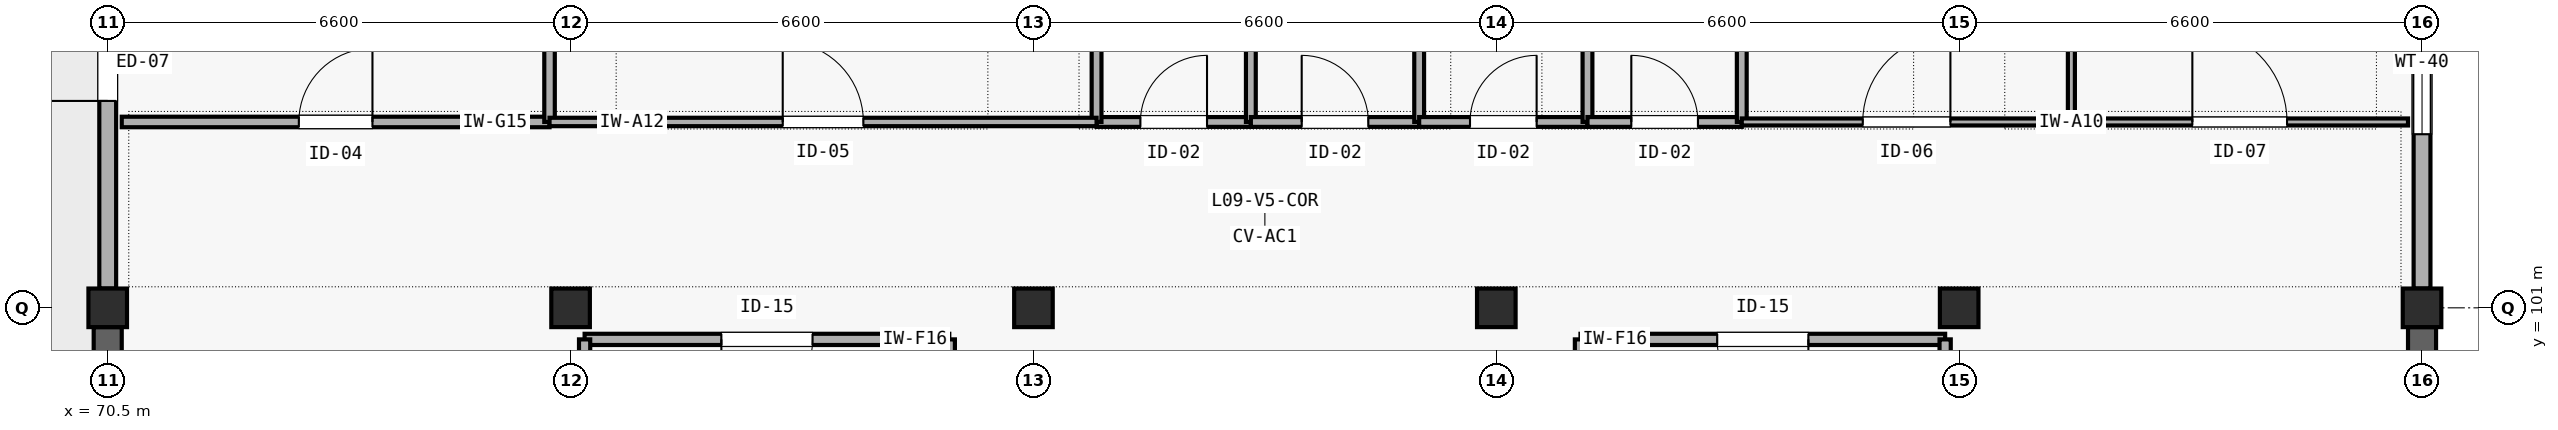
"""IFC4 building model, lengths in metres.
Left out: names, types, materials, properties, quantities, classifications, styles, units other than length and angle.
Written with IfcOpenShell. Run it as: python <this file> out.ifc"""

import sys

from ifc_helpers import new_model, si_unit, direction, frame, frame_2d, origin, origin_2d, place, context, subcontext, project, spatial, rectangle, extrude, element, fill, save


model = new_model("IFC4")
c1 = context("Model", 3, precision=1e-05, world=origin(), true_north=direction((0.0, 1.0)))
c2 = subcontext(c1, "Body", "Model", "MODEL_VIEW")
j1 = project(units=[si_unit("LENGTHUNIT", "METRE"), si_unit("PLANEANGLEUNIT", "RADIAN")], contexts=[c1])
p1 = place(None, origin())
s1 = spatial("IfcSite", under=j1, at=p1, CompositionType="ELEMENT")
p2 = place(p1, origin())
s2 = spatial("IfcBuilding", under=s1, at=p2, CompositionType="ELEMENT")
p3 = place(p2, frame((0.0, 0.0, 37.8)))
s3 = spatial("IfcBuildingStorey", under=s2, at=p3, CompositionType="ELEMENT", Elevation=37.8)
for number, where, z_axis, x_axis in (
    (1, (70.5, 101.0, 0.0), (0.0, 0.0, 1.0), (1.0, 0.0, 0.0)),
    (2, (77.1, 101.0, 0.0), (0.0, 0.0, 1.0), (1.0, 0.0, 0.0)),
    (3, (83.7, 101.0, 0.0), (0.0, 0.0, 1.0), (1.0, 0.0, 0.0)),
    (4, (90.3, 101.0, 0.0), (0.0, 0.0, 1.0), (1.0, 0.0, 0.0)),
    (5, (96.9, 101.0, 0.0), (0.0, 0.0, 1.0), (1.0, 0.0, 0.0)),
    (6, (103.5, 101.0, 0.0), (0.0, 0.0, 1.0), (1.0, 0.0, 0.0)),
):
    element("IfcColumn", number, at=place(p3, frame(where, z_axis=z_axis, x_axis=x_axis)), inside=s3, PredefinedType="COLUMN", context=c2, shape_type="SweptSolid", body=[
        extrude(rectangle(XDim=0.55, YDim=0.55, at=origin_2d()), origin(), (0.0, 0.0, 1.0), 4.2),
    ])
p4 = place(p3, frame((70.5, 97.96, 0.0), z_axis=(0.0, 0.0, 1.0), x_axis=(0.0, 1.0, 0.0)))
e7 = element("IfcWall", 7, at=p4, inside=s3, PredefinedType="SHEAR", context=c2, shape_type="SweptSolid", body=[
    extrude(rectangle(XDim=2.765, YDim=0.4, at=frame_2d((1.383, 0.0))), origin(), (0.0, 0.0, 1.0), 3.85),
])
p5 = place(p3, frame((70.5, 101.275, 0.0), z_axis=(0.0, 0.0, 1.0), x_axis=(0.0, 1.0, 0.0)))
e8 = element("IfcWall", 8, at=p5, inside=s3, PredefinedType="SOLIDWALL", context=c2, shape_type="SweptSolid", body=[
    extrude(rectangle(XDim=6.45, YDim=0.24, at=frame_2d((3.225, 0.0))), origin(), (0.0, 0.0, 1.0), 3.465),
])
p6 = place(p5, frame((2.675, 0.0, 0.0)))
e9 = element("IfcOpeningElement", 9, at=p6, cuts=e8, PredefinedType="OPENING", context=c2, shape_type="SweptSolid", body=[
    extrude(rectangle(XDim=1.1, YDim=2.1, at=frame_2d((0.55, 1.05))), frame((0.0, 0.13, 0.0), z_axis=(0.0, -1.0, 0.0), x_axis=(1.0, 0.0, 0.0)), (0.0, 0.0, 1.0), 0.26),
])
p7 = place(p3, frame((103.5, 97.96, 0.0), z_axis=(0.0, 0.0, 1.0), x_axis=(0.0, 1.0, 0.0)))
e10 = element("IfcWall", 10, at=p7, inside=s3, PredefinedType="SHEAR", context=c2, shape_type="SweptSolid", body=[
    extrude(rectangle(XDim=2.765, YDim=0.4, at=frame_2d((1.383, 0.0))), origin(), (0.0, 0.0, 1.0), 3.85),
])
p8 = place(p3, frame((103.5, 101.275, 0.0), z_axis=(0.0, 0.0, 1.0), x_axis=(0.0, 1.0, 0.0)))
e11 = element("IfcWall", 11, at=p8, inside=s3, PredefinedType="SOLIDWALL", context=c2, shape_type="SweptSolid", body=[
    extrude(rectangle(XDim=6.45, YDim=0.24, at=frame_2d((3.225, 0.0))), origin(), (0.0, 0.0, 1.0), 3.565),
])
p9 = place(p8, frame((2.2, 0.0, 0.85)))
e12 = element("IfcOpeningElement", 12, at=p9, cuts=e11, PredefinedType="OPENING", context=c2, shape_type="SweptSolid", body=[
    extrude(rectangle(XDim=2.05, YDim=1.55, at=frame_2d((1.025, 0.775))), frame((0.0, 0.13, 0.0), z_axis=(0.0, -1.0, 0.0), x_axis=(1.0, 0.0, 0.0)), (0.0, 0.0, 1.0), 0.26),
])
p10 = place(p3, frame((77.3, 100.55, 0.0), z_axis=(0.0, 0.0, 1.0), x_axis=(1.0, 0.0, 0.0)))
e13 = element("IfcWall", 13, at=p10, inside=s3, PredefinedType="SOLIDWALL", context=c2, shape_type="SweptSolid", body=[
    extrude(rectangle(XDim=5.2, YDim=0.16, at=frame_2d((2.6, 0.0))), origin(), (0.0, 0.0, 1.0), 3.9),
])
p11 = place(p10, frame((1.95, 0.0, 0.0)))
e14 = element("IfcOpeningElement", 14, at=p11, cuts=e13, PredefinedType="OPENING", context=c2, shape_type="SweptSolid", body=[
    extrude(rectangle(XDim=1.3, YDim=2.15, at=frame_2d((0.65, 1.075))), frame((0.0, 0.09, 0.0), z_axis=(0.0, -1.0, 0.0), x_axis=(1.0, 0.0, 0.0)), (0.0, 0.0, 1.0), 0.18),
])
p12 = place(p3, frame((77.3, 97.5, 0.0), z_axis=(0.0, 0.0, 1.0), x_axis=(0.0, 1.0, 0.0)))
e15 = element("IfcWall", 15, at=p12, inside=s3, PredefinedType="SOLIDWALL", context=c2, shape_type="SweptSolid", body=[
    extrude(rectangle(XDim=3.05, YDim=0.16, at=frame_2d((1.525, 0.0))), origin(), (0.0, 0.0, 1.0), 3.405),
])
p13 = place(p3, frame((82.5, 97.5, 0.0), z_axis=(0.0, 0.0, 1.0), x_axis=(0.0, 1.0, 0.0)))
e16 = element("IfcWall", 16, at=p13, inside=s3, PredefinedType="SOLIDWALL", context=c2, shape_type="SweptSolid", body=[
    extrude(rectangle(XDim=3.05, YDim=0.16, at=frame_2d((1.525, 0.0))), origin(), (0.0, 0.0, 1.0), 3.9),
])
p14 = place(p3, frame((91.5, 100.55, 0.0), z_axis=(0.0, 0.0, 1.0), x_axis=(1.0, 0.0, 0.0)))
e17 = element("IfcWall", 17, at=p14, inside=s3, PredefinedType="SOLIDWALL", context=c2, shape_type="SweptSolid", body=[
    extrude(rectangle(XDim=5.2, YDim=0.16, at=frame_2d((2.6, 0.0))), origin(), (0.0, 0.0, 1.0), 3.9),
])
p15 = place(p14, frame((1.95, 0.0, 0.0)))
e18 = element("IfcOpeningElement", 18, at=p15, cuts=e17, PredefinedType="OPENING", context=c2, shape_type="SweptSolid", body=[
    extrude(rectangle(XDim=1.3, YDim=2.15, at=frame_2d((0.65, 1.075))), frame((0.0, 0.09, 0.0), z_axis=(0.0, -1.0, 0.0), x_axis=(1.0, 0.0, 0.0)), (0.0, 0.0, 1.0), 0.18),
])
p16 = place(p3, frame((91.5, 97.5, 0.0), z_axis=(0.0, 0.0, 1.0), x_axis=(0.0, 1.0, 0.0)))
e19 = element("IfcWall", 19, at=p16, inside=s3, PredefinedType="SOLIDWALL", context=c2, shape_type="SweptSolid", body=[
    extrude(rectangle(XDim=3.05, YDim=0.16, at=frame_2d((1.525, 0.0))), origin(), (0.0, 0.0, 1.0), 3.9),
])
p17 = place(p3, frame((96.7, 97.5, 0.0), z_axis=(0.0, 0.0, 1.0), x_axis=(0.0, 1.0, 0.0)))
e20 = element("IfcWall", 20, at=p17, inside=s3, PredefinedType="SOLIDWALL", context=c2, shape_type="SweptSolid", body=[
    extrude(rectangle(XDim=3.05, YDim=0.16, at=frame_2d((1.525, 0.0))), origin(), (0.0, 0.0, 1.0), 3.405),
])
p18 = place(p3, frame((84.6, 103.65, 0.0), z_axis=(0.0, 0.0, 1.0), x_axis=(1.0, 0.0, 0.0)))
e21 = element("IfcWall", 21, at=p18, inside=s3, PredefinedType="PLUMBINGWALL", context=c2, shape_type="SweptSolid", body=[
    extrude(rectangle(XDim=2.2, YDim=0.14, at=frame_2d((1.1, 0.0))), origin(), (0.0, 0.0, 1.0), 3.9),
])
p19 = place(p18, frame((0.625, 0.0, 0.0)))
e22 = element("IfcOpeningElement", 22, at=p19, cuts=e21, PredefinedType="OPENING", context=c2, shape_type="SweptSolid", body=[
    extrude(rectangle(XDim=0.95, YDim=2.1, at=frame_2d((0.475, 1.05))), frame((0.0, 0.08, 0.0), z_axis=(0.0, -1.0, 0.0), x_axis=(1.0, 0.0, 0.0)), (0.0, 0.0, 1.0), 0.16),
])
for number, where, z_axis, x_axis in (
    (23, (84.6, 103.65, 0.0), (0.0, 0.0, 1.0), (0.0, 1.0, 0.0)),
    (24, (86.8, 103.65, 0.0), (0.0, 0.0, 1.0), (0.0, 1.0, 0.0)),
):
    element("IfcWall", number, at=place(p3, frame(where, z_axis=z_axis, x_axis=x_axis)), inside=s3, PredefinedType="PLUMBINGWALL", context=c2, shape_type="SweptSolid", body=[
        extrude(rectangle(XDim=4.15, YDim=0.14, at=frame_2d((2.075, 0.0))), origin(), (0.0, 0.0, 1.0), 3.9),
    ])
p20 = place(p3, frame((86.8, 103.65, 0.0), z_axis=(0.0, 0.0, 1.0), x_axis=(1.0, 0.0, 0.0)))
e25 = element("IfcWall", 25, at=p20, inside=s3, PredefinedType="PLUMBINGWALL", context=c2, shape_type="SweptSolid", body=[
    extrude(rectangle(XDim=2.4, YDim=0.14, at=frame_2d((1.2, 0.0))), origin(), (0.0, 0.0, 1.0), 3.9),
])
p21 = place(p20, frame((0.725, 0.0, 0.0)))
e26 = element("IfcOpeningElement", 26, at=p21, cuts=e25, PredefinedType="OPENING", context=c2, shape_type="SweptSolid", body=[
    extrude(rectangle(XDim=0.95, YDim=2.1, at=frame_2d((0.475, 1.05))), frame((0.0, 0.08, 0.0), z_axis=(0.0, -1.0, 0.0), x_axis=(1.0, 0.0, 0.0)), (0.0, 0.0, 1.0), 0.16),
])
p22 = place(p3, frame((89.2, 103.65, 0.0), z_axis=(0.0, 0.0, 1.0), x_axis=(0.0, 1.0, 0.0)))
e27 = element("IfcWall", 27, at=p22, inside=s3, PredefinedType="PLUMBINGWALL", context=c2, shape_type="SweptSolid", body=[
    extrude(rectangle(XDim=4.15, YDim=0.14, at=frame_2d((2.075, 0.0))), origin(), (0.0, 0.0, 1.0), 3.9),
])
p23 = place(p3, frame((89.2, 103.65, 0.0), z_axis=(0.0, 0.0, 1.0), x_axis=(1.0, 0.0, 0.0)))
e28 = element("IfcWall", 28, at=p23, inside=s3, PredefinedType="PLUMBINGWALL", context=c2, shape_type="SweptSolid", body=[
    extrude(rectangle(XDim=2.4, YDim=0.14, at=frame_2d((1.2, 0.0))), origin(), (0.0, 0.0, 1.0), 3.9),
])
p24 = place(p23, frame((0.725, 0.0, 0.0)))
e29 = element("IfcOpeningElement", 29, at=p24, cuts=e28, PredefinedType="OPENING", context=c2, shape_type="SweptSolid", body=[
    extrude(rectangle(XDim=0.95, YDim=2.1, at=frame_2d((0.475, 1.05))), frame((0.0, 0.08, 0.0), z_axis=(0.0, -1.0, 0.0), x_axis=(1.0, 0.0, 0.0)), (0.0, 0.0, 1.0), 0.16),
])
p25 = place(p3, frame((91.6, 103.65, 0.0), z_axis=(0.0, 0.0, 1.0), x_axis=(0.0, 1.0, 0.0)))
e30 = element("IfcWall", 30, at=p25, inside=s3, PredefinedType="PLUMBINGWALL", context=c2, shape_type="SweptSolid", body=[
    extrude(rectangle(XDim=4.15, YDim=0.14, at=frame_2d((2.075, 0.0))), origin(), (0.0, 0.0, 1.0), 3.9),
])
p26 = place(p3, frame((91.6, 103.65, 0.0), z_axis=(0.0, 0.0, 1.0), x_axis=(1.0, 0.0, 0.0)))
e31 = element("IfcWall", 31, at=p26, inside=s3, PredefinedType="PLUMBINGWALL", context=c2, shape_type="SweptSolid", body=[
    extrude(rectangle(XDim=2.2, YDim=0.14, at=frame_2d((1.1, 0.0))), origin(), (0.0, 0.0, 1.0), 3.9),
])
p27 = place(p26, frame((0.625, 0.0, 0.0)))
e32 = element("IfcOpeningElement", 32, at=p27, cuts=e31, PredefinedType="OPENING", context=c2, shape_type="SweptSolid", body=[
    extrude(rectangle(XDim=0.95, YDim=2.1, at=frame_2d((0.475, 1.05))), frame((0.0, 0.08, 0.0), z_axis=(0.0, -1.0, 0.0), x_axis=(1.0, 0.0, 0.0)), (0.0, 0.0, 1.0), 0.16),
])
p28 = place(p3, frame((93.8, 103.65, 0.0), z_axis=(0.0, 0.0, 1.0), x_axis=(0.0, 1.0, 0.0)))
e33 = element("IfcWall", 33, at=p28, inside=s3, PredefinedType="PLUMBINGWALL", context=c2, shape_type="SweptSolid", body=[
    extrude(rectangle(XDim=4.15, YDim=0.14, at=frame_2d((2.075, 0.0))), origin(), (0.0, 0.0, 1.0), 3.9),
])
p29 = place(p3, frame((70.7, 103.65, 0.0), z_axis=(0.0, 0.0, 1.0), x_axis=(1.0, 0.0, 0.0)))
e34 = element("IfcWall", 34, at=p29, inside=s3, PredefinedType="PARTITIONING", context=c2, shape_type="SweptSolid", body=[
    extrude(rectangle(XDim=6.1, YDim=0.15, at=frame_2d((3.05, 0.0))), origin(), (0.0, 0.0, 1.0), 3.9),
])
p30 = place(p29, frame((2.525, 0.0, 0.0)))
e35 = element("IfcOpeningElement", 35, at=p30, cuts=e34, PredefinedType="OPENING", context=c2, shape_type="SweptSolid", body=[
    extrude(rectangle(XDim=1.05, YDim=2.15, at=frame_2d((0.525, 1.075))), frame((0.0, 0.085, 0.0), z_axis=(0.0, -1.0, 0.0), x_axis=(1.0, 0.0, 0.0)), (0.0, 0.0, 1.0), 0.17),
])
p31 = place(p3, frame((76.8, 103.65, 0.0), z_axis=(0.0, 0.0, 1.0), x_axis=(0.0, 1.0, 0.0)))
e36 = element("IfcWall", 36, at=p31, inside=s3, PredefinedType="PARTITIONING", context=c2, shape_type="SweptSolid", body=[
    extrude(rectangle(XDim=11.15, YDim=0.15, at=frame_2d((5.575, 0.0))), origin(), (0.0, 0.0, 1.0), 3.9),
])
p32 = place(p3, frame((76.8, 103.65, 0.0), z_axis=(0.0, 0.0, 1.0), x_axis=(1.0, 0.0, 0.0)))
e37 = element("IfcWall", 37, at=p32, inside=s3, PredefinedType="PARTITIONING", context=c2, shape_type="SweptSolid", body=[
    extrude(rectangle(XDim=7.8, YDim=0.12, at=frame_2d((3.9, 0.0))), origin(), (0.0, 0.0, 1.0), 3.9),
])
p33 = place(p32, frame((3.325, 0.0, 0.0)))
e38 = element("IfcOpeningElement", 38, at=p33, cuts=e37, PredefinedType="OPENING", context=c2, shape_type="SweptSolid", body=[
    extrude(rectangle(XDim=1.15, YDim=2.15, at=frame_2d((0.575, 1.075))), frame((0.0, 0.07, 0.0), z_axis=(0.0, -1.0, 0.0), x_axis=(1.0, 0.0, 0.0)), (0.0, 0.0, 1.0), 0.14),
])
p34 = place(p3, frame((93.8, 103.65, 0.0), z_axis=(0.0, 0.0, 1.0), x_axis=(1.0, 0.0, 0.0)))
e39 = element("IfcWall", 39, at=p34, inside=s3, PredefinedType="PARTITIONING", context=c2, shape_type="SweptSolid", body=[
    extrude(rectangle(XDim=4.7, YDim=0.1, at=frame_2d((2.35, 0.0))), origin(), (0.0, 0.0, 1.0), 3.9),
])
p35 = place(p34, frame((1.725, 0.0, 0.0)))
e40 = element("IfcOpeningElement", 40, at=p35, cuts=e39, PredefinedType="OPENING", context=c2, shape_type="SweptSolid", body=[
    extrude(rectangle(XDim=1.25, YDim=2.15, at=frame_2d((0.625, 1.075))), frame((0.0, 0.06, 0.0), z_axis=(0.0, -1.0, 0.0), x_axis=(1.0, 0.0, 0.0)), (0.0, 0.0, 1.0), 0.12),
])
p36 = place(p3, frame((98.5, 103.65, 0.0), z_axis=(0.0, 0.0, 1.0), x_axis=(0.0, 1.0, 0.0)))
e41 = element("IfcWall", 41, at=p36, inside=s3, PredefinedType="PARTITIONING", context=c2, shape_type="SweptSolid", body=[
    extrude(rectangle(XDim=11.15, YDim=0.1, at=frame_2d((5.575, 0.0))), origin(), (0.0, 0.0, 1.0), 3.9),
])
p37 = place(p3, frame((98.5, 103.65, 0.0), z_axis=(0.0, 0.0, 1.0), x_axis=(1.0, 0.0, 0.0)))
e42 = element("IfcWall", 42, at=p37, inside=s3, PredefinedType="PARTITIONING", context=c2, shape_type="SweptSolid", body=[
    extrude(rectangle(XDim=4.8, YDim=0.1, at=frame_2d((2.4, 0.0))), origin(), (0.0, 0.0, 1.0), 3.9),
])
p38 = place(p37, frame((1.725, 0.0, 0.0)))
e43 = element("IfcOpeningElement", 43, at=p38, cuts=e42, PredefinedType="OPENING", context=c2, shape_type="SweptSolid", body=[
    extrude(rectangle(XDim=1.35, YDim=2.2, at=frame_2d((0.675, 1.1))), frame((0.0, 0.06, 0.0), z_axis=(0.0, -1.0, 0.0), x_axis=(1.0, 0.0, 0.0)), (0.0, 0.0, 1.0), 0.12),
])
p39 = place(p6, origin())
e44 = element("IfcDoor", 44, at=p39, inside=s3, OperationType="SINGLE_SWING_LEFT", PredefinedType="DOOR", context=c2, shape_type="SweptSolid", body=[
    extrude(rectangle(XDim=1.1, YDim=2.1, at=frame_2d((0.55, 1.05))), frame((0.0, 0.025, 0.0), z_axis=(0.0, -1.0, 0.0), x_axis=(1.0, 0.0, 0.0)), (0.0, 0.0, 1.0), 0.05),
])
fill(e9, e44)
p40 = place(p9, origin())
e45 = element("IfcWindow", 45, at=p40, inside=s3, PartitioningType="SINGLE_PANEL", PredefinedType="WINDOW", context=c2, shape_type="SweptSolid", body=[
    extrude(rectangle(XDim=2.05, YDim=1.55, at=frame_2d((1.025, 0.775))), frame((0.0, 0.03, 0.0), z_axis=(0.0, -1.0, 0.0), x_axis=(1.0, 0.0, 0.0)), (0.0, 0.0, 1.0), 0.06),
])
fill(e12, e45)
p41 = place(p11, frame((1.3, 0.0, 0.0), z_axis=(0.0, 0.0, 1.0), x_axis=(-1.0, 0.0, 0.0)))
e46 = element("IfcDoor", 46, at=p41, inside=s3, OperationType="SINGLE_SWING_RIGHT", PredefinedType="DOOR", context=c2, shape_type="SweptSolid", body=[
    extrude(rectangle(XDim=1.3, YDim=2.15, at=frame_2d((0.65, 1.075))), frame((0.0, 0.025, 0.0), z_axis=(0.0, -1.0, 0.0), x_axis=(1.0, 0.0, 0.0)), (0.0, 0.0, 1.0), 0.05),
])
fill(e14, e46)
p42 = place(p15, frame((1.3, 0.0, 0.0), z_axis=(0.0, 0.0, 1.0), x_axis=(-1.0, 0.0, 0.0)))
e47 = element("IfcDoor", 47, at=p42, inside=s3, OperationType="SINGLE_SWING_LEFT", PredefinedType="DOOR", context=c2, shape_type="SweptSolid", body=[
    extrude(rectangle(XDim=1.3, YDim=2.15, at=frame_2d((0.65, 1.075))), frame((0.0, 0.025, 0.0), z_axis=(0.0, -1.0, 0.0), x_axis=(1.0, 0.0, 0.0)), (0.0, 0.0, 1.0), 0.05),
])
fill(e18, e47)
p43 = place(p19, origin())
e48 = element("IfcDoor", 48, at=p43, inside=s3, OperationType="SINGLE_SWING_RIGHT", PredefinedType="DOOR", context=c2, shape_type="SweptSolid", body=[
    extrude(rectangle(XDim=0.95, YDim=2.1, at=frame_2d((0.475, 1.05))), frame((0.0, 0.025, 0.0), z_axis=(0.0, -1.0, 0.0), x_axis=(1.0, 0.0, 0.0)), (0.0, 0.0, 1.0), 0.05),
])
fill(e22, e48)
p44 = place(p21, origin())
e49 = element("IfcDoor", 49, at=p44, inside=s3, OperationType="SINGLE_SWING_LEFT", PredefinedType="DOOR", context=c2, shape_type="SweptSolid", body=[
    extrude(rectangle(XDim=0.95, YDim=2.1, at=frame_2d((0.475, 1.05))), frame((0.0, 0.025, 0.0), z_axis=(0.0, -1.0, 0.0), x_axis=(1.0, 0.0, 0.0)), (0.0, 0.0, 1.0), 0.05),
])
fill(e26, e49)
p45 = place(p24, origin())
e50 = element("IfcDoor", 50, at=p45, inside=s3, OperationType="SINGLE_SWING_RIGHT", PredefinedType="DOOR", context=c2, shape_type="SweptSolid", body=[
    extrude(rectangle(XDim=0.95, YDim=2.1, at=frame_2d((0.475, 1.05))), frame((0.0, 0.025, 0.0), z_axis=(0.0, -1.0, 0.0), x_axis=(1.0, 0.0, 0.0)), (0.0, 0.0, 1.0), 0.05),
])
fill(e29, e50)
p46 = place(p27, origin())
e51 = element("IfcDoor", 51, at=p46, inside=s3, OperationType="SINGLE_SWING_LEFT", PredefinedType="DOOR", context=c2, shape_type="SweptSolid", body=[
    extrude(rectangle(XDim=0.95, YDim=2.1, at=frame_2d((0.475, 1.05))), frame((0.0, 0.025, 0.0), z_axis=(0.0, -1.0, 0.0), x_axis=(1.0, 0.0, 0.0)), (0.0, 0.0, 1.0), 0.05),
])
fill(e32, e51)
p47 = place(p30, origin())
e52 = element("IfcDoor", 52, at=p47, inside=s3, OperationType="SINGLE_SWING_RIGHT", PredefinedType="DOOR", context=c2, shape_type="SweptSolid", body=[
    extrude(rectangle(XDim=1.05, YDim=2.15, at=frame_2d((0.525, 1.075))), frame((0.0, 0.025, 0.0), z_axis=(0.0, -1.0, 0.0), x_axis=(1.0, 0.0, 0.0)), (0.0, 0.0, 1.0), 0.05),
])
fill(e35, e52)
p48 = place(p33, origin())
e53 = element("IfcDoor", 53, at=p48, inside=s3, OperationType="SINGLE_SWING_LEFT", PredefinedType="DOOR", context=c2, shape_type="SweptSolid", body=[
    extrude(rectangle(XDim=1.15, YDim=2.15, at=frame_2d((0.575, 1.075))), frame((0.0, 0.025, 0.0), z_axis=(0.0, -1.0, 0.0), x_axis=(1.0, 0.0, 0.0)), (0.0, 0.0, 1.0), 0.05),
])
fill(e38, e53)
p49 = place(p35, origin())
e54 = element("IfcDoor", 54, at=p49, inside=s3, OperationType="SINGLE_SWING_RIGHT", PredefinedType="DOOR", context=c2, shape_type="SweptSolid", body=[
    extrude(rectangle(XDim=1.25, YDim=2.15, at=frame_2d((0.625, 1.075))), frame((0.0, 0.025, 0.0), z_axis=(0.0, -1.0, 0.0), x_axis=(1.0, 0.0, 0.0)), (0.0, 0.0, 1.0), 0.05),
])
fill(e40, e54)
p50 = place(p38, origin())
e55 = element("IfcDoor", 55, at=p50, inside=s3, OperationType="SINGLE_SWING_LEFT", PredefinedType="DOOR", context=c2, shape_type="SweptSolid", body=[
    extrude(rectangle(XDim=1.35, YDim=2.2, at=frame_2d((0.675, 1.1))), frame((0.0, 0.025, 0.0), z_axis=(0.0, -1.0, 0.0), x_axis=(1.0, 0.0, 0.0)), (0.0, 0.0, 1.0), 0.05),
])
fill(e43, e55)
save(model, sys.argv[1])
